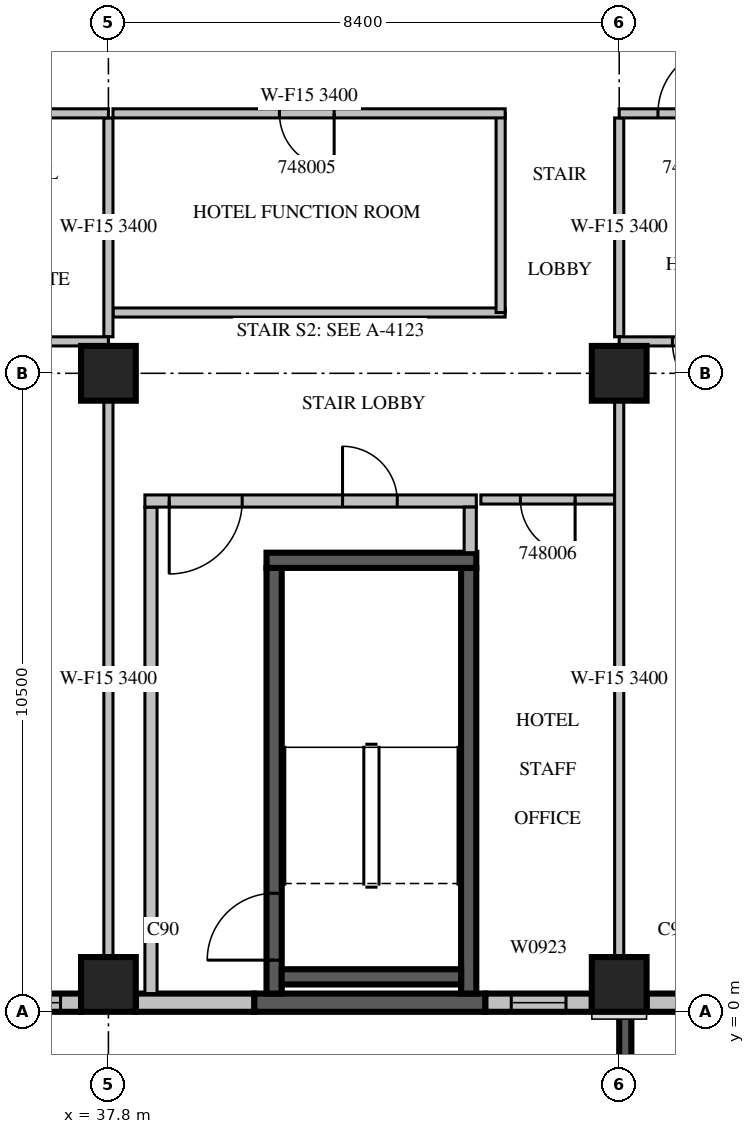
"""IFC4 building model, lengths in metres.
Left out: names, types, materials, properties, quantities, classifications, styles, units other than length and angle.
Written with IfcOpenShell. Run it as: python <this file> out.ifc"""

import sys

from ifc_helpers import new_model, si_unit, direction, frame, frame_2d, origin, origin_2d, place, context, subcontext, project, spatial, rectangle, extrude, source, transform, mapped, element, fill, save


model = new_model("IFC4")
c1 = context("Model", 3, precision=1e-05, world=origin(), true_north=direction((0.0, 1.0)))
c2 = subcontext(c1, "Body", "Model", "MODEL_VIEW")
j1 = project(units=[si_unit("LENGTHUNIT", "METRE"), si_unit("PLANEANGLEUNIT", "RADIAN")], contexts=[c1])
p1 = place(None, origin())
s1 = spatial("IfcSite", under=j1, at=p1, CompositionType="ELEMENT")
p2 = place(p1, origin())
s2 = spatial("IfcBuilding", under=s1, at=p2, CompositionType="ELEMENT")
p3 = place(p2, frame((0.0, 0.0, 215.8)))
s3 = spatial("IfcBuildingStorey", under=s2, at=p3, CompositionType="ELEMENT", Elevation=215.8)
m1 = source(origin(), c2, "Body", "SweptSolid", [
    extrude(rectangle(XDim=0.9, YDim=0.9, at=origin_2d()), origin(), (0.0, 0.0, 1.0), 3.8),
])
for number, where, z_axis, x_axis in (
    (1, (37.8, 0.45, 0.0), (0.0, 0.0, 1.0), (1.0, 0.0, 0.0)),
    (2, (46.2, 0.45, 0.0), (0.0, 0.0, 1.0), (1.0, 0.0, 0.0)),
    (3, (37.8, 10.5, 0.0), (0.0, 0.0, 1.0), (1.0, 0.0, 0.0)),
    (4, (46.2, 10.5, 0.0), (0.0, 0.0, 1.0), (1.0, 0.0, 0.0)),
):
    element("IfcColumn", number, at=place(p3, frame(where, z_axis=z_axis, x_axis=x_axis)), inside=s3, PredefinedType="COLUMN", context=c2, shape_type="MappedRepresentation", body=[
        mapped(m1, transform((0.0, 0.0, 0.0), scale=1.0)),
    ])
m2 = source(origin(), c2, "Body", "SweptSolid", [
    extrude(rectangle(XDim=3.9, YDim=0.2, at=frame_2d((1.95, 0.0))), origin(), (0.0, 0.0, 1.0), 3.4),
])
p4 = place(p3, frame((46.3, 0.0, 0.0), z_axis=(0.0, 0.0, 1.0), x_axis=(0.0, -1.0, 0.0)))
e5 = element("IfcWall", 5, at=p4, inside=s3, PredefinedType="SOLIDWALL", context=c2, shape_type="MappedRepresentation", body=[
    mapped(m2, transform((0.0, 0.0, 0.0), scale=1.0)),
])
m3 = source(origin(), c2, "Body", "SweptSolid", [
    extrude(rectangle(XDim=2.4, YDim=2.3, at=frame_2d((1.2, 1.15))), frame((0.0, 0.11, 0.0), z_axis=(0.0, -1.0, 0.0), x_axis=(1.0, 0.0, 0.0)), (0.0, 0.0, 1.0), 0.22),
])
p5 = place(p4, frame((0.75, 0.0, 0.6)))
e6 = element("IfcOpeningElement", 6, at=p5, cuts=e5, PredefinedType="OPENING", context=c2, shape_type="MappedRepresentation", body=[
    mapped(m3, transform((0.0, 0.0, 0.0), scale=1.0)),
])
m4 = source(origin(), c2, "Body", "SweptSolid", [
    extrude(rectangle(XDim=7.5, YDim=0.3, at=frame_2d((3.75, 0.0))), origin(), (0.0, 0.0, 1.0), 3.4),
])
p6 = place(p3, frame((29.85, 0.15, 0.0), z_axis=(0.0, 0.0, 1.0), x_axis=(1.0, 0.0, 0.0)))
e7 = element("IfcWall", 7, at=p6, inside=s3, PredefinedType="STANDARD", context=c2, shape_type="MappedRepresentation", body=[
    mapped(m4, transform((0.0, 0.0, 0.0), scale=1.0)),
])
m5 = source(origin(), c2, "Body", "SweptSolid", [
    extrude(rectangle(XDim=1.2, YDim=2.3, at=frame_2d((0.6, 1.15))), frame((0.0, 0.16, 0.0), z_axis=(0.0, -1.0, 0.0), x_axis=(1.0, 0.0, 0.0)), (0.0, 0.0, 1.0), 0.32),
])
p7 = place(p6, frame((0.438, 0.0, 0.6)))
e8 = element("IfcOpeningElement", 8, at=p7, cuts=e7, PredefinedType="OPENING", context=c2, shape_type="MappedRepresentation", body=[
    mapped(m5, transform((0.0, 0.0, 0.0), scale=1.0)),
])
p8 = place(p6, frame((5.963, 0.0, 0.6)))
e9 = element("IfcOpeningElement", 9, at=p8, cuts=e7, PredefinedType="OPENING", context=c2, shape_type="MappedRepresentation", body=[
    mapped(m5, transform((0.0, 0.0, 0.0), scale=1.0)),
])
m6 = source(origin(), c2, "Body", "SweptSolid", [
    extrude(rectangle(XDim=1.95, YDim=0.3, at=frame_2d((0.975, 0.0))), origin(), (0.0, 0.0, 1.0), 3.4),
])
p9 = place(p3, frame((38.25, 0.15, 0.0), z_axis=(0.0, 0.0, 1.0), x_axis=(1.0, 0.0, 0.0)))
e10 = element("IfcWall", 10, at=p9, inside=s3, PredefinedType="STANDARD", context=c2, shape_type="MappedRepresentation", body=[
    mapped(m6, transform((0.0, 0.0, 0.0), scale=1.0)),
])
m7 = source(origin(), c2, "Body", "SweptSolid", [
    extrude(rectangle(XDim=3.8, YDim=0.3, at=frame_2d((1.9, 0.0))), origin(), (0.0, 0.0, 1.0), 3.4),
])
p10 = place(p3, frame((40.2, 0.15, 0.0), z_axis=(0.0, 0.0, 1.0), x_axis=(1.0, 0.0, 0.0)))
e11 = element("IfcWall", 11, at=p10, inside=s3, PredefinedType="SOLIDWALL", context=c2, shape_type="MappedRepresentation", body=[
    mapped(m7, transform((0.0, 0.0, 0.0), scale=1.0)),
])
m8 = source(origin(), c2, "Body", "SweptSolid", [
    extrude(rectangle(XDim=1.75, YDim=0.3, at=frame_2d((0.875, 0.0))), origin(), (0.0, 0.0, 1.0), 3.4),
])
p11 = place(p3, frame((44.0, 0.15, 0.0), z_axis=(0.0, 0.0, 1.0), x_axis=(1.0, 0.0, 0.0)))
e12 = element("IfcWall", 12, at=p11, inside=s3, PredefinedType="STANDARD", context=c2, shape_type="MappedRepresentation", body=[
    mapped(m8, transform((0.0, 0.0, 0.0), scale=1.0)),
])
m9 = source(origin(), c2, "Body", "SweptSolid", [
    extrude(rectangle(XDim=0.9, YDim=2.3, at=frame_2d((0.45, 1.15))), frame((0.0, 0.16, 0.0), z_axis=(0.0, -1.0, 0.0), x_axis=(1.0, 0.0, 0.0)), (0.0, 0.0, 1.0), 0.32),
])
p12 = place(p11, frame((0.425, 0.0, 0.6)))
e13 = element("IfcOpeningElement", 13, at=p12, cuts=e12, PredefinedType="OPENING", context=c2, shape_type="MappedRepresentation", body=[
    mapped(m9, transform((0.0, 0.0, 0.0), scale=1.0)),
])
m10 = source(origin(), c2, "Body", "SweptSolid", [
    extrude(rectangle(XDim=4.98, YDim=0.3, at=frame_2d((2.49, 0.0))), origin(), (0.0, 0.0, 1.0), 3.4),
])
p13 = place(p3, frame((46.65, 0.15, 0.0), z_axis=(0.0, 0.0, 1.0), x_axis=(1.0, 0.0, 0.0)))
e14 = element("IfcWall", 14, at=p13, inside=s3, PredefinedType="STANDARD", context=c2, shape_type="MappedRepresentation", body=[
    mapped(m10, transform((0.0, 0.0, 0.0), scale=1.0)),
])
m11 = source(origin(), c2, "Body", "SweptSolid", [
    extrude(rectangle(XDim=1.0, YDim=2.1, at=frame_2d((0.5, 1.05))), frame((0.0, 0.16, 0.0), z_axis=(0.0, -1.0, 0.0), x_axis=(1.0, 0.0, 0.0)), (0.0, 0.0, 1.0), 0.32),
])
p14 = place(p13, frame((1.99, 0.0, 0.0)))
e15 = element("IfcOpeningElement", 15, at=p14, cuts=e14, PredefinedType="OPENING", context=c2, shape_type="MappedRepresentation", body=[
    mapped(m11, transform((0.0, 0.0, 0.0), scale=1.0)),
])
m12 = source(origin(), c2, "Body", "SweptSolid", [
    extrude(rectangle(XDim=7.0, YDim=0.25, at=frame_2d((3.5, 0.0))), origin(), (0.0, 0.0, 1.0), 3.4),
])
p15 = place(p3, frame((40.525, 0.3, 0.0), z_axis=(0.0, 0.0, 1.0), x_axis=(0.0, 1.0, 0.0)))
e16 = element("IfcWall", 16, at=p15, inside=s3, PredefinedType="SOLIDWALL", context=c2, shape_type="MappedRepresentation", body=[
    mapped(m12, transform((0.0, 0.0, 0.0), scale=1.0)),
])
m13 = source(origin(), c2, "Body", "SweptSolid", [
    extrude(rectangle(XDim=1.1, YDim=2.1, at=frame_2d((0.55, 1.05))), frame((0.0, 0.135, 0.0), z_axis=(0.0, -1.0, 0.0), x_axis=(1.0, 0.0, 0.0)), (0.0, 0.0, 1.0), 0.27),
])
p16 = place(p15, frame((0.55, 0.0, 0.0)))
e17 = element("IfcOpeningElement", 17, at=p16, cuts=e16, PredefinedType="OPENING", context=c2, shape_type="MappedRepresentation", body=[
    mapped(m13, transform((0.0, 0.0, 0.0), scale=1.0)),
])
p17 = place(p3, frame((43.725, 0.3, 0.0), z_axis=(0.0, 0.0, 1.0), x_axis=(0.0, 1.0, 0.0)))
e18 = element("IfcWall", 18, at=p17, inside=s3, PredefinedType="SOLIDWALL", context=c2, shape_type="MappedRepresentation", body=[
    mapped(m12, transform((0.0, 0.0, 0.0), scale=1.0)),
])
m14 = source(origin(), c2, "Body", "SweptSolid", [
    extrude(rectangle(XDim=3.45, YDim=0.25, at=frame_2d((1.725, 0.0))), origin(), (0.0, 0.0, 1.0), 3.4),
])
p18 = place(p3, frame((40.4, 7.425, 0.0), z_axis=(0.0, 0.0, 1.0), x_axis=(1.0, 0.0, 0.0)))
e19 = element("IfcWall", 19, at=p18, inside=s3, PredefinedType="SOLIDWALL", context=c2, shape_type="MappedRepresentation", body=[
    mapped(m14, transform((0.0, 0.0, 0.0), scale=1.0)),
])
m15 = source(origin(), c2, "Body", "SweptSolid", [
    extrude(rectangle(XDim=2.95, YDim=0.25, at=frame_2d((1.475, 0.0))), origin(), (0.0, 0.0, 1.0), 3.4),
])
p19 = place(p3, frame((40.65, 0.575, 0.0), z_axis=(0.0, 0.0, 1.0), x_axis=(1.0, 0.0, 0.0)))
e20 = element("IfcWall", 20, at=p19, inside=s3, PredefinedType="SOLIDWALL", context=c2, shape_type="MappedRepresentation", body=[
    mapped(m15, transform((0.0, 0.0, 0.0), scale=1.0)),
])
m16 = source(origin(), c2, "Body", "SweptSolid", [
    extrude(rectangle(XDim=8.0, YDim=0.2, at=frame_2d((4.0, 0.0))), origin(), (0.0, 0.0, 1.0), 3.4),
])
p20 = place(p3, frame((38.5, 0.3, 0.0), z_axis=(0.0, 0.0, 1.0), x_axis=(0.0, 1.0, 0.0)))
e21 = element("IfcWall", 21, at=p20, inside=s3, PredefinedType="PARTITIONING", context=c2, shape_type="MappedRepresentation", body=[
    mapped(m16, transform((0.0, 0.0, 0.0), scale=1.0)),
])
m17 = source(origin(), c2, "Body", "SweptSolid", [
    extrude(rectangle(XDim=5.45, YDim=0.2, at=frame_2d((2.725, 0.0))), origin(), (0.0, 0.0, 1.0), 3.4),
])
p21 = place(p3, frame((38.4, 8.4, 0.0), z_axis=(0.0, 0.0, 1.0), x_axis=(1.0, 0.0, 0.0)))
e22 = element("IfcWall", 22, at=p21, inside=s3, PredefinedType="PARTITIONING", context=c2, shape_type="MappedRepresentation", body=[
    mapped(m17, transform((0.0, 0.0, 0.0), scale=1.0)),
])
m18 = source(origin(), c2, "Body", "SweptSolid", [
    extrude(rectangle(XDim=1.2, YDim=2.1, at=frame_2d((0.6, 1.05))), frame((0.0, 0.11, 0.0), z_axis=(0.0, -1.0, 0.0), x_axis=(1.0, 0.0, 0.0)), (0.0, 0.0, 1.0), 0.22),
])
p22 = place(p21, frame((0.4, 0.0, 0.0)))
e23 = element("IfcOpeningElement", 23, at=p22, cuts=e22, PredefinedType="OPENING", context=c2, shape_type="MappedRepresentation", body=[
    mapped(m18, transform((0.0, 0.0, 0.0), scale=1.0)),
])
m19 = source(origin(), c2, "Body", "SweptSolid", [
    extrude(rectangle(XDim=0.9, YDim=2.1, at=frame_2d((0.45, 1.05))), frame((0.0, 0.11, 0.0), z_axis=(0.0, -1.0, 0.0), x_axis=(1.0, 0.0, 0.0)), (0.0, 0.0, 1.0), 0.22),
])
p23 = place(p21, frame((3.25, 0.0, 0.0)))
e24 = element("IfcOpeningElement", 24, at=p23, cuts=e22, PredefinedType="OPENING", context=c2, shape_type="MappedRepresentation", body=[
    mapped(m19, transform((0.0, 0.0, 0.0), scale=1.0)),
])
m20 = source(origin(), c2, "Body", "SweptSolid", [
    extrude(rectangle(XDim=0.75, YDim=0.2, at=frame_2d((0.375, 0.0))), origin(), (0.0, 0.0, 1.0), 3.4),
])
p24 = place(p3, frame((43.75, 7.55, 0.0), z_axis=(0.0, 0.0, 1.0), x_axis=(0.0, 1.0, 0.0)))
e25 = element("IfcWall", 25, at=p24, inside=s3, PredefinedType="PARTITIONING", context=c2, shape_type="MappedRepresentation", body=[
    mapped(m20, transform((0.0, 0.0, 0.0), scale=1.0)),
])
m21 = source(origin(), c2, "Body", "SweptSolid", [
    extrude(rectangle(XDim=6.45, YDim=0.15, at=frame_2d((3.225, 0.0))), origin(), (0.0, 0.0, 1.0), 3.4),
])
p25 = place(p3, frame((37.875, 11.5, 0.0), z_axis=(0.0, 0.0, 1.0), x_axis=(1.0, 0.0, 0.0)))
e26 = element("IfcWall", 26, at=p25, inside=s3, PredefinedType="PARTITIONING", context=c2, shape_type="MappedRepresentation", body=[
    mapped(m21, transform((0.0, 0.0, 0.0), scale=1.0)),
])
p26 = place(p3, frame((44.25, 11.5, 0.0), z_axis=(0.0, 0.0, 1.0), x_axis=(0.0, 1.0, 0.0)))
e27 = element("IfcWall", 27, at=p26, inside=s3, PredefinedType="PARTITIONING", context=c2, shape_type="SweptSolid", body=[
    extrude(rectangle(XDim=3.275, YDim=0.15, at=frame_2d((1.637, 0.0))), origin(), (0.0, 0.0, 1.0), 3.4),
])
p27 = place(p3, frame((44.325, 14.775, 0.0), z_axis=(0.0, 0.0, 1.0), x_axis=(-1.0, 0.0, 0.0)))
e28 = element("IfcWall", 28, at=p27, inside=s3, PredefinedType="PARTITIONING", context=c2, shape_type="MappedRepresentation", body=[
    mapped(m21, transform((0.0, 0.0, 0.0), scale=1.0)),
])
m22 = source(origin(), c2, "Body", "SweptSolid", [
    extrude(rectangle(XDim=0.9, YDim=2.1, at=frame_2d((0.45, 1.05))), frame((0.0, 0.085, 0.0), z_axis=(0.0, -1.0, 0.0), x_axis=(1.0, 0.0, 0.0)), (0.0, 0.0, 1.0), 0.17),
])
p28 = place(p27, frame((2.812, 0.0, 0.0)))
e29 = element("IfcOpeningElement", 29, at=p28, cuts=e28, PredefinedType="OPENING", context=c2, shape_type="MappedRepresentation", body=[
    mapped(m22, transform((0.0, 0.0, 0.0), scale=1.0)),
])
m23 = source(origin(), c2, "Body", "SweptSolid", [
    extrude(rectangle(XDim=2.2, YDim=0.15, at=frame_2d((1.1, 0.0))), origin(), (0.0, 0.0, 1.0), 3.4),
])
p29 = place(p3, frame((46.125, 8.425, 0.0), z_axis=(0.0, 0.0, 1.0), x_axis=(-1.0, 0.0, 0.0)))
e30 = element("IfcWall", 30, at=p29, inside=s3, PredefinedType="PARTITIONING", context=c2, shape_type="MappedRepresentation", body=[
    mapped(m23, transform((0.0, 0.0, 0.0), scale=1.0)),
])
p30 = place(p29, frame((0.65, 0.0, 0.0)))
e31 = element("IfcOpeningElement", 31, at=p30, cuts=e30, PredefinedType="OPENING", context=c2, shape_type="MappedRepresentation", body=[
    mapped(m22, transform((0.0, 0.0, 0.0), scale=1.0)),
])
m24 = source(origin(), c2, "Body", "SweptSolid", [
    extrude(rectangle(XDim=9.152, YDim=0.15, at=frame_2d((4.576, 0.0))), origin(), (0.0, 0.0, 1.0), 3.4),
])
p31 = place(p3, frame((37.8, 0.899, 0.0), z_axis=(0.0, 0.0, 1.0), x_axis=(0.0, 1.0, 0.0)))
e32 = element("IfcWall", 32, at=p31, inside=s3, PredefinedType="PARTITIONING", context=c2, shape_type="MappedRepresentation", body=[
    mapped(m24, transform((0.0, 0.0, 0.0), scale=1.0)),
])
m25 = source(origin(), c2, "Body", "SweptSolid", [
    extrude(rectangle(XDim=3.6, YDim=0.15, at=frame_2d((1.8, 0.0))), origin(), (0.0, 0.0, 1.0), 3.4),
])
p32 = place(p3, frame((37.8, 11.1, 0.0), z_axis=(0.0, 0.0, 1.0), x_axis=(0.0, 1.0, 0.0)))
e33 = element("IfcWall", 33, at=p32, inside=s3, PredefinedType="PARTITIONING", context=c2, shape_type="MappedRepresentation", body=[
    mapped(m25, transform((0.0, 0.0, 0.0), scale=1.0)),
])
m26 = source(origin(), c2, "Body", "SweptSolid", [
    extrude(rectangle(XDim=8.4, YDim=0.15, at=frame_2d((4.2, 0.0))), origin(), (0.0, 0.0, 1.0), 3.4),
])
p33 = place(p3, frame((37.8, 11.025, 0.0), z_axis=(0.0, 0.0, 1.0), x_axis=(-1.0, 0.0, 0.0)))
e34 = element("IfcWall", 34, at=p33, inside=s3, PredefinedType="PARTITIONING", context=c2, shape_type="MappedRepresentation", body=[
    mapped(m26, transform((0.0, 0.0, 0.0), scale=1.0)),
])
p34 = place(p33, frame((7.025, 0.0, 0.0)))
e35 = element("IfcOpeningElement", 35, at=p34, cuts=e34, PredefinedType="OPENING", context=c2, shape_type="MappedRepresentation", body=[
    mapped(m22, transform((0.0, 0.0, 0.0), scale=1.0)),
])
p35 = place(p33, frame((5.013, 0.0, 0.0)))
e36 = element("IfcOpeningElement", 36, at=p35, cuts=e34, PredefinedType="OPENING", context=c2, shape_type="MappedRepresentation", body=[
    mapped(m22, transform((0.0, 0.0, 0.0), scale=1.0)),
])
m27 = source(origin(), c2, "Body", "SweptSolid", [
    extrude(rectangle(XDim=1.0, YDim=2.1, at=frame_2d((0.5, 1.05))), frame((0.0, 0.085, 0.0), z_axis=(0.0, -1.0, 0.0), x_axis=(1.0, 0.0, 0.0)), (0.0, 0.0, 1.0), 0.17),
])
p36 = place(p33, frame((2.9, 0.0, 0.0)))
e37 = element("IfcOpeningElement", 37, at=p36, cuts=e34, PredefinedType="OPENING", context=c2, shape_type="MappedRepresentation", body=[
    mapped(m27, transform((0.0, 0.0, 0.0), scale=1.0)),
])
p37 = place(p33, frame((1.087, 0.0, 0.0)))
e38 = element("IfcOpeningElement", 38, at=p37, cuts=e34, PredefinedType="OPENING", context=c2, shape_type="MappedRepresentation", body=[
    mapped(m22, transform((0.0, 0.0, 0.0), scale=1.0)),
])
p38 = place(p3, frame((46.2, 0.899, 0.0), z_axis=(0.0, 0.0, 1.0), x_axis=(0.0, 1.0, 0.0)))
e39 = element("IfcWall", 39, at=p38, inside=s3, PredefinedType="PARTITIONING", context=c2, shape_type="MappedRepresentation", body=[
    mapped(m24, transform((0.0, 0.0, 0.0), scale=1.0)),
])
p39 = place(p3, frame((46.2, 11.1, 0.0), z_axis=(0.0, 0.0, 1.0), x_axis=(0.0, 1.0, 0.0)))
e40 = element("IfcWall", 40, at=p39, inside=s3, PredefinedType="PARTITIONING", context=c2, shape_type="MappedRepresentation", body=[
    mapped(m25, transform((0.0, 0.0, 0.0), scale=1.0)),
])
m28 = source(origin(), c2, "Body", "SweptSolid", [
    extrude(rectangle(XDim=7.355, YDim=0.15, at=frame_2d((3.678, 0.0))), origin(), (0.0, 0.0, 1.0), 3.4),
])
p40 = place(p3, frame((53.555, 11.025, 0.0), z_axis=(0.0, 0.0, 1.0), x_axis=(-1.0, 0.0, 0.0)))
e41 = element("IfcWall", 41, at=p40, inside=s3, PredefinedType="PARTITIONING", context=c2, shape_type="MappedRepresentation", body=[
    mapped(m28, transform((0.0, 0.0, 0.0), scale=1.0)),
])
m29 = source(origin(), c2, "Body", "SweptSolid", [
    extrude(rectangle(XDim=1.1, YDim=2.1, at=frame_2d((0.55, 1.05))), frame((0.0, 0.085, 0.0), z_axis=(0.0, -1.0, 0.0), x_axis=(1.0, 0.0, 0.0)), (0.0, 0.0, 1.0), 0.17),
])
p41 = place(p40, frame((5.38, 0.0, 0.0)))
e42 = element("IfcOpeningElement", 42, at=p41, cuts=e41, PredefinedType="OPENING", context=c2, shape_type="MappedRepresentation", body=[
    mapped(m29, transform((0.0, 0.0, 0.0), scale=1.0)),
])
p42 = place(p40, frame((3.106, 0.0, 0.0)))
e43 = element("IfcOpeningElement", 43, at=p42, cuts=e41, PredefinedType="OPENING", context=c2, shape_type="MappedRepresentation", body=[
    mapped(m22, transform((0.0, 0.0, 0.0), scale=1.0)),
])
p43 = place(p3, frame((37.8, 14.775, 0.0), z_axis=(0.0, 0.0, 1.0), x_axis=(-1.0, 0.0, 0.0)))
e44 = element("IfcWall", 44, at=p43, inside=s3, PredefinedType="PARTITIONING", context=c2, shape_type="MappedRepresentation", body=[
    mapped(m26, transform((0.0, 0.0, 0.0), scale=1.0)),
])
p44 = place(p43, frame((7.112, 0.0, 0.0)))
e45 = element("IfcOpeningElement", 45, at=p44, cuts=e44, PredefinedType="OPENING", context=c2, shape_type="MappedRepresentation", body=[
    mapped(m27, transform((0.0, 0.0, 0.0), scale=1.0)),
])
p45 = place(p43, frame((2.95, 0.0, 0.0)))
e46 = element("IfcOpeningElement", 46, at=p45, cuts=e44, PredefinedType="OPENING", context=c2, shape_type="MappedRepresentation", body=[
    mapped(m27, transform((0.0, 0.0, 0.0), scale=1.0)),
])
p46 = place(p3, frame((53.555, 14.775, 0.0), z_axis=(0.0, 0.0, 1.0), x_axis=(-1.0, 0.0, 0.0)))
e47 = element("IfcWall", 47, at=p46, inside=s3, PredefinedType="PARTITIONING", context=c2, shape_type="MappedRepresentation", body=[
    mapped(m28, transform((0.0, 0.0, 0.0), scale=1.0)),
])
p47 = place(p46, frame((5.618, 0.0, 0.0)))
e48 = element("IfcOpeningElement", 48, at=p47, cuts=e47, PredefinedType="OPENING", context=c2, shape_type="MappedRepresentation", body=[
    mapped(m29, transform((0.0, 0.0, 0.0), scale=1.0)),
])
m30 = source(origin(), c2, "Body", "SweptSolid", [
    extrude(rectangle(XDim=1.2, YDim=2.3, at=frame_2d((0.6, 1.15))), frame((0.0, 0.03, 0.0), z_axis=(0.0, -1.0, 0.0), x_axis=(1.0, 0.0, 0.0)), (0.0, 0.0, 1.0), 0.06),
])
p48 = place(p8, origin())
e49 = element("IfcWindow", 49, at=p48, inside=s3, PartitioningType="SINGLE_PANEL", PredefinedType="WINDOW", context=c2, shape_type="MappedRepresentation", body=[
    mapped(m30, transform((0.0, 0.0, 0.0), scale=1.0)),
])
fill(e9, e49)
m31 = source(origin(), c2, "Body", "SweptSolid", [
    extrude(rectangle(XDim=0.9, YDim=2.3, at=frame_2d((0.45, 1.15))), frame((0.0, 0.03, 0.0), z_axis=(0.0, -1.0, 0.0), x_axis=(1.0, 0.0, 0.0)), (0.0, 0.0, 1.0), 0.06),
])
p49 = place(p12, origin())
e50 = element("IfcWindow", 50, at=p49, inside=s3, PartitioningType="SINGLE_PANEL", PredefinedType="WINDOW", context=c2, shape_type="MappedRepresentation", body=[
    mapped(m31, transform((0.0, 0.0, 0.0), scale=1.0)),
])
fill(e13, e50)
m32 = source(origin(), c2, "Body", "SweptSolid", [
    extrude(rectangle(XDim=1.1, YDim=2.1, at=frame_2d((0.55, 1.05))), frame((0.0, 0.025, 0.0), z_axis=(0.0, -1.0, 0.0), x_axis=(1.0, 0.0, 0.0)), (0.0, 0.0, 1.0), 0.05),
])
p50 = place(p16, origin())
e51 = element("IfcDoor", 51, at=p50, inside=s3, OperationType="SINGLE_SWING_LEFT", PredefinedType="DOOR", context=c2, shape_type="MappedRepresentation", body=[
    mapped(m32, transform((0.0, 0.0, 0.0), scale=1.0)),
])
fill(e17, e51)
m33 = source(origin(), c2, "Body", "SweptSolid", [
    extrude(rectangle(XDim=1.2, YDim=2.1, at=frame_2d((0.6, 1.05))), frame((0.0, 0.025, 0.0), z_axis=(0.0, -1.0, 0.0), x_axis=(1.0, 0.0, 0.0)), (0.0, 0.0, 1.0), 0.05),
])
p51 = place(p22, origin())
e52 = element("IfcDoor", 52, at=p51, inside=s3, OperationType="SINGLE_SWING_RIGHT", PredefinedType="DOOR", context=c2, shape_type="MappedRepresentation", body=[
    mapped(m33, transform((0.0, 0.0, 0.0), scale=1.0)),
])
fill(e23, e52)
m34 = source(origin(), c2, "Body", "SweptSolid", [
    extrude(rectangle(XDim=0.9, YDim=2.1, at=frame_2d((0.45, 1.05))), frame((0.0, 0.025, 0.0), z_axis=(0.0, -1.0, 0.0), x_axis=(1.0, 0.0, 0.0)), (0.0, 0.0, 1.0), 0.05),
])
p52 = place(p23, origin())
e53 = element("IfcDoor", 53, at=p52, inside=s3, OperationType="SINGLE_SWING_LEFT", PredefinedType="DOOR", context=c2, shape_type="MappedRepresentation", body=[
    mapped(m34, transform((0.0, 0.0, 0.0), scale=1.0)),
])
fill(e24, e53)
p53 = place(p28, origin())
e54 = element("IfcDoor", 54, at=p53, inside=s3, OperationType="SINGLE_SWING_LEFT", PredefinedType="DOOR", context=c2, shape_type="MappedRepresentation", body=[
    mapped(m34, transform((0.0, 0.0, 0.0), scale=1.0)),
])
fill(e29, e54)
p54 = place(p30, origin())
e55 = element("IfcDoor", 55, at=p54, inside=s3, OperationType="SINGLE_SWING_LEFT", PredefinedType="DOOR", context=c2, shape_type="MappedRepresentation", body=[
    mapped(m34, transform((0.0, 0.0, 0.0), scale=1.0)),
])
fill(e31, e55)
p55 = place(p47, origin())
e56 = element("IfcDoor", 56, at=p55, inside=s3, OperationType="SINGLE_SWING_RIGHT", PredefinedType="DOOR", context=c2, shape_type="MappedRepresentation", body=[
    mapped(m32, transform((0.0, 0.0, 0.0), scale=1.0)),
])
fill(e48, e56)
p56 = place(p41, origin())
e57 = element("IfcDoor", 57, at=p56, inside=s3, OperationType="SINGLE_SWING_LEFT", PredefinedType="DOOR", context=c2, shape_type="MappedRepresentation", body=[
    mapped(m32, transform((0.0, 0.0, 0.0), scale=1.0)),
])
fill(e42, e57)
save(model, sys.argv[1])
